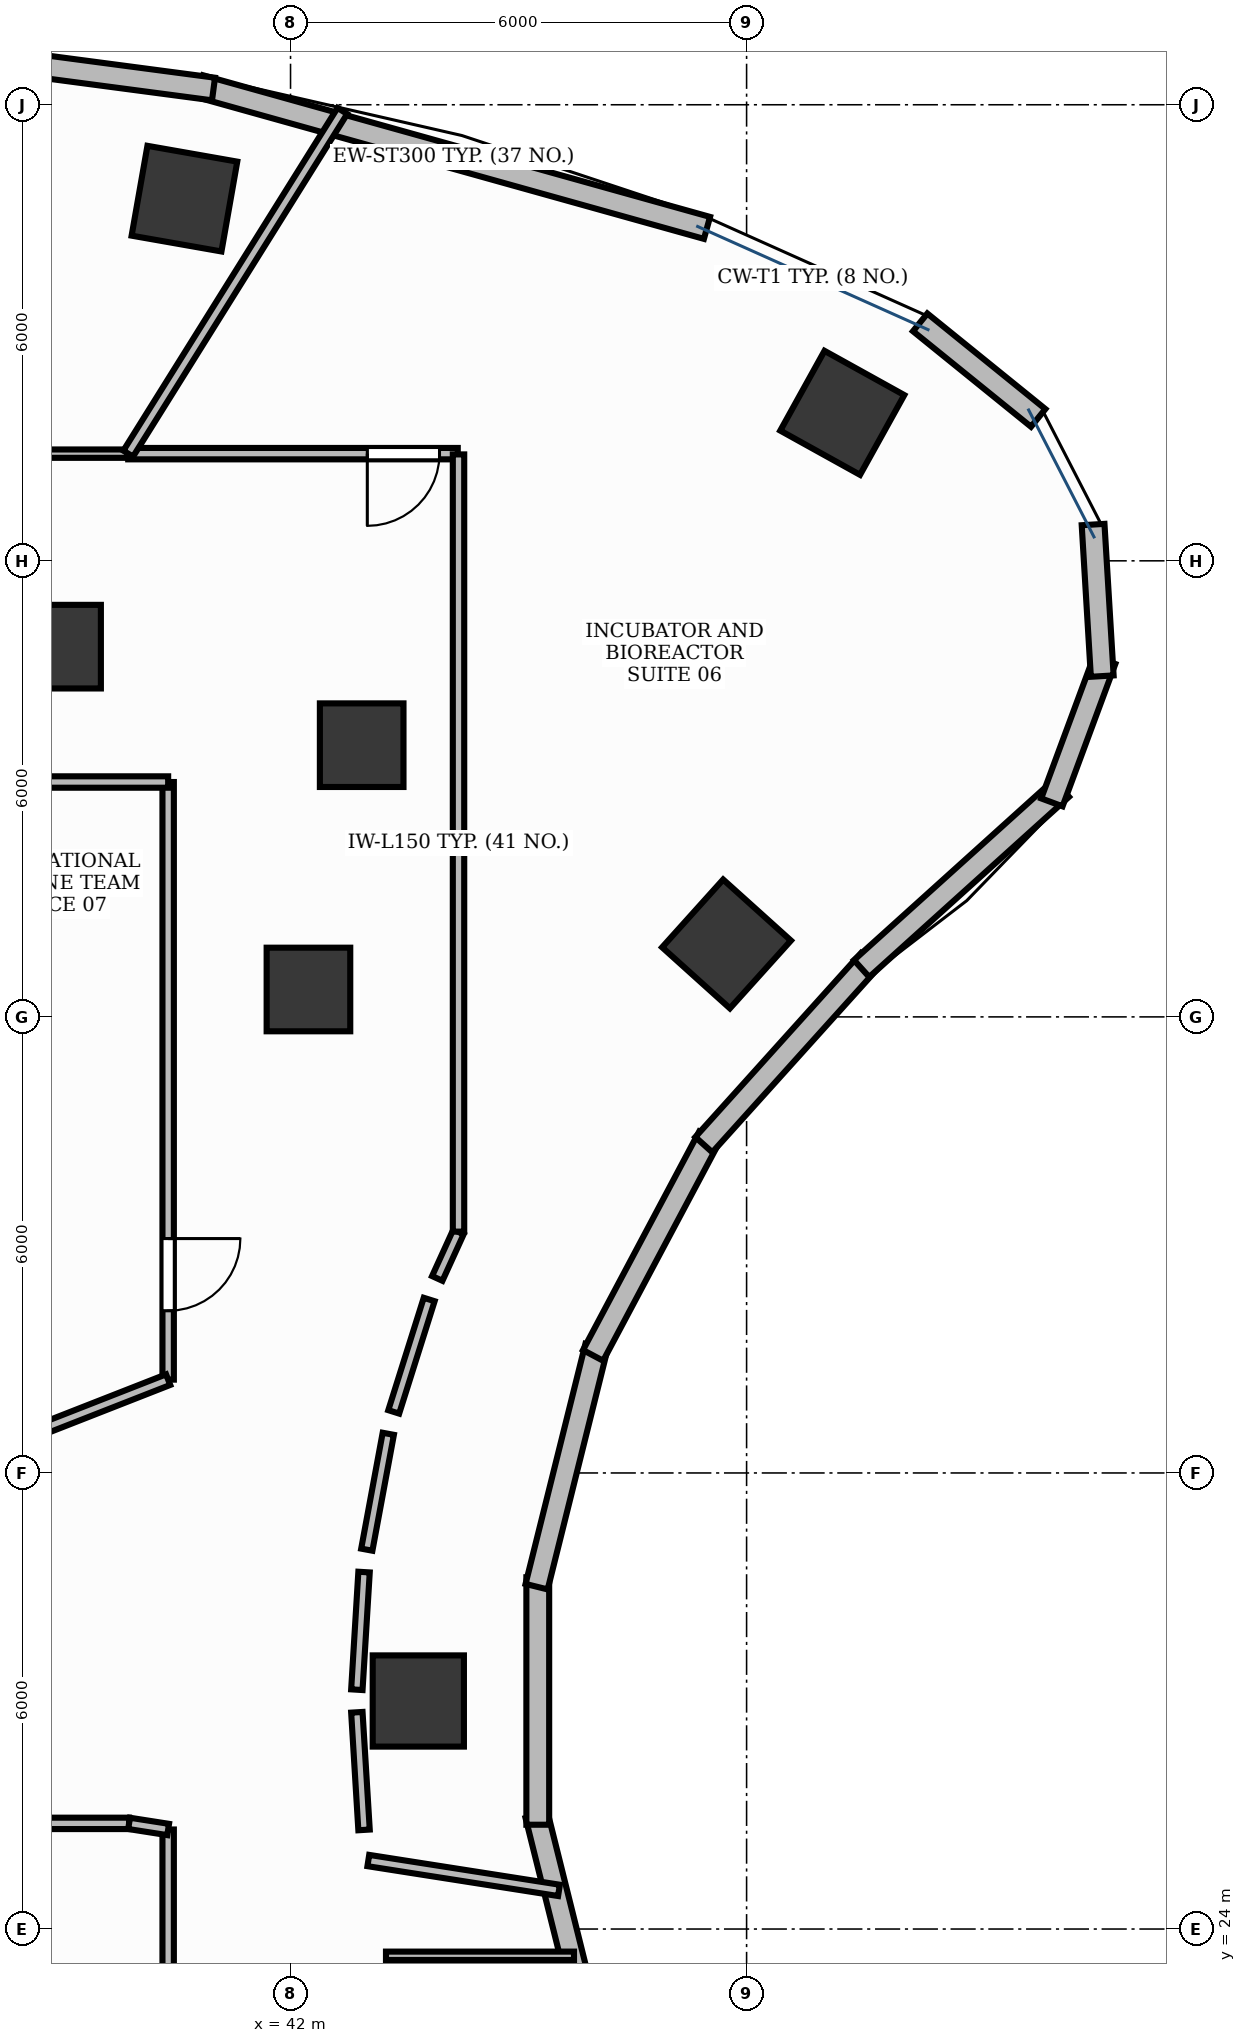
"""IFC4 building model, lengths in metres.
Left out: names, types, materials, properties, quantities, classifications, styles, units other than length and angle.
Written with IfcOpenShell. Run it as: python <this file> out.ifc"""

import sys

from ifc_helpers import new_model, si_unit, direction, frame, frame_2d, origin, origin_2d, place, context, subcontext, project, spatial, rectangle, extrude, element, fill, save


model = new_model("IFC4")
c1 = context("Model", 3, precision=1e-05, world=origin(), true_north=direction((0.0, 1.0)))
c2 = subcontext(c1, "Body", "Model", "MODEL_VIEW")
j1 = project(units=[si_unit("LENGTHUNIT", "METRE"), si_unit("PLANEANGLEUNIT", "RADIAN")], contexts=[c1])
p1 = place(None, origin())
s1 = spatial("IfcSite", under=j1, at=p1, CompositionType="ELEMENT")
p2 = place(p1, origin())
s2 = spatial("IfcBuilding", under=s1, at=p2, CompositionType="ELEMENT")
p3 = place(p2, frame((0.0, 0.0, 119.4)))
s3 = spatial("IfcBuildingStorey", under=s2, at=p3, CompositionType="ELEMENT", Elevation=119.4)
p4 = place(p3, frame((49.259, 43.947, -0.0), z_axis=(0.0, 0.0, 1.0), x_axis=(-0.874535078577, 0.484962262797, 0.0)))
e1 = element("IfcColumn", 1, at=p4, inside=s3, PredefinedType="COLUMN", context=c2, shape_type="SweptSolid", body=[
    extrude(rectangle(XDim=1.2, YDim=1.2, at=origin_2d()), origin(), (0.0, 0.0, 1.0), 3.901),
])
p5 = place(p3, frame((42.936, 39.575, -0.0), z_axis=(0.0, 0.0, 1.0), x_axis=(1.0, 0.0, 0.0)))
e2 = element("IfcColumn", 2, at=p5, inside=s3, PredefinedType="COLUMN", context=c2, shape_type="SweptSolid", body=[
    extrude(rectangle(XDim=1.1, YDim=1.1, at=origin_2d()), origin(), (0.0, 0.0, 1.0), 3.901),
])
p6 = place(p3, frame((40.604, 46.765, -0.0), z_axis=(0.0, 0.0, 1.0), x_axis=(-0.984868307662, 0.173304404339, 0.0)))
e3 = element("IfcColumn", 3, at=p6, inside=s3, PredefinedType="COLUMN", context=c2, shape_type="SweptSolid", body=[
    extrude(rectangle(XDim=1.2, YDim=1.2, at=origin_2d()), origin(), (0.0, 0.0, 1.0), 3.901),
])
p7 = place(p3, frame((38.955, 40.871, -0.0), z_axis=(0.0, 0.0, 1.0), x_axis=(1.0, 0.0, 0.0)))
e4 = element("IfcColumn", 4, at=p7, inside=s3, PredefinedType="COLUMN", context=c2, shape_type="SweptSolid", body=[
    extrude(rectangle(XDim=1.1, YDim=1.1, at=origin_2d()), origin(), (0.0, 0.0, 1.0), 3.901),
])
for number, where, z_axis, x_axis in (
    (5, (43.681, 27.0, -0.0), (0.0, 0.0, 1.0), (0.0, 1.0, 0.0)),
    (6, (47.736, 36.96, -0.0), (0.0, 0.0, 1.0), (0.669, 0.743, 0.0)),
):
    element("IfcColumn", number, at=place(p3, frame(where, z_axis=z_axis, x_axis=x_axis)), inside=s3, PredefinedType="COLUMN", context=c2, shape_type="SweptSolid", body=[
        extrude(rectangle(XDim=1.2, YDim=1.2, at=origin_2d()), origin(), (0.0, 0.0, 1.0), 3.901),
    ])
p8 = place(p3, frame((42.236, 36.361, -0.0), z_axis=(0.0, 0.0, 1.0), x_axis=(1.0, 0.0, 0.0)))
e7 = element("IfcColumn", 7, at=p8, inside=s3, PredefinedType="COLUMN", context=c2, shape_type="SweptSolid", body=[
    extrude(rectangle(XDim=1.1, YDim=1.1, at=origin_2d()), origin(), (0.0, 0.0, 1.0), 3.901),
])
p9 = place(p3, frame((47.479, 46.38, 0.0), z_axis=(0.0, 0.0, 1.0), x_axis=(-0.963116215402, 0.269085777459, 0.0)))
e8 = element("IfcWall", 8, at=p9, inside=s3, PredefinedType="STANDARD", context=c2, shape_type="SweptSolid", body=[
    extrude(rectangle(XDim=6.924, YDim=0.3, at=frame_2d((3.462, 0.0))), origin(), (0.0, 0.0, 1.0), 3.9),
])
p10 = place(p3, frame((40.987, 48.207, 0.0), z_axis=(0.0, 0.0, 1.0), x_axis=(-0.991372969521, 0.131071107816, 0.0)))
e9 = element("IfcWall", 9, at=p10, inside=s3, PredefinedType="STANDARD", context=c2, shape_type="SweptSolid", body=[
    extrude(rectangle(XDim=3.615, YDim=0.3, at=frame_2d((1.808, 0.0))), origin(), (0.0, 0.0, 1.0), 3.9),
])
p11 = place(p3, frame((46.025, 22.337, 0.0), z_axis=(0.0, 0.0, 1.0), x_axis=(-0.241900409149, 0.970301083197, 0.0)))
e10 = element("IfcWall", 10, at=p11, inside=s3, PredefinedType="STANDARD", context=c2, shape_type="SweptSolid", body=[
    extrude(rectangle(XDim=3.256, YDim=0.3, at=frame_2d((1.628, 0.0))), origin(), (0.0, 0.0, 1.0), 3.9),
])
p12 = place(p3, frame((45.253, 25.372, 0.0), z_axis=(0.0, 0.0, 1.0), x_axis=(0.0, 1.0, 0.0)))
e11 = element("IfcWall", 11, at=p12, inside=s3, PredefinedType="STANDARD", context=c2, shape_type="SweptSolid", body=[
    extrude(rectangle(XDim=3.255, YDim=0.3, at=frame_2d((1.628, 0.0))), origin(), (0.0, 0.0, 1.0), 3.9),
])
p13 = place(p3, frame((45.238, 28.504, 0.0), z_axis=(0.0, 0.0, 1.0), x_axis=(0.241900409149, 0.970301083197, 0.0)))
e12 = element("IfcWall", 12, at=p13, inside=s3, PredefinedType="STANDARD", context=c2, shape_type="SweptSolid", body=[
    extrude(rectangle(XDim=3.256, YDim=0.3, at=frame_2d((1.628, 0.0))), origin(), (0.0, 0.0, 1.0), 3.9),
])
p14 = place(p3, frame((45.98, 31.547, 0.0), z_axis=(0.0, 0.0, 1.0), x_axis=(0.469451284634, 0.882958374645, 0.0)))
e13 = element("IfcWall", 13, at=p14, inside=s3, PredefinedType="STANDARD", context=c2, shape_type="SweptSolid", body=[
    extrude(rectangle(XDim=3.256, YDim=0.3, at=frame_2d((1.628, 0.0))), origin(), (0.0, 0.0, 1.0), 3.9),
])
p15 = place(p3, frame((47.437, 34.319, 0.0), z_axis=(0.0, 0.0, 1.0), x_axis=(0.669167727967, 0.743111399353, 0.0)))
e14 = element("IfcWall", 14, at=p15, inside=s3, PredefinedType="STANDARD", context=c2, shape_type="SweptSolid", body=[
    extrude(rectangle(XDim=3.255, YDim=0.3, at=frame_2d((1.628, 0.0))), origin(), (0.0, 0.0, 1.0), 3.9),
])
p16 = place(p3, frame((49.513, 36.636, 0.0), z_axis=(0.0, 0.0, 1.0), x_axis=(0.74255963233, 0.669779958221, 0.0)))
e15 = element("IfcWall", 15, at=p16, inside=s3, PredefinedType="STANDARD", context=c2, shape_type="SweptSolid", body=[
    extrude(rectangle(XDim=3.539, YDim=0.3, at=frame_2d((1.77, 0.0))), origin(), (0.0, 0.0, 1.0), 3.9),
])
p17 = place(p3, frame((52.016, 38.822, 0.0), z_axis=(0.0, 0.0, 1.0), x_axis=(0.347370087337, 0.937728117539, 0.0)))
e16 = element("IfcWall", 16, at=p17, inside=s3, PredefinedType="STANDARD", context=c2, shape_type="SweptSolid", body=[
    extrude(rectangle(XDim=1.997, YDim=0.3, at=frame_2d((0.999, 0.0))), origin(), (0.0, 0.0, 1.0), 3.9),
])
for number, where, z_axis, x_axis in (
    (17, (52.679, 40.483, 0.0), (0.0, 0.0, 1.0), (-0.06, 0.998, 0.0)),
    (18, (51.836, 43.881, 0.0), (0.0, 0.0, 1.0), (-0.777, 0.629, 0.0)),
):
    element("IfcWall", number, at=place(p3, frame(where, z_axis=z_axis, x_axis=x_axis)), inside=s3, PredefinedType="STANDARD", context=c2, shape_type="SweptSolid", body=[
        extrude(rectangle(XDim=1.998, YDim=0.3, at=frame_2d((0.999, 0.0))), origin(), (0.0, 0.0, 1.0), 3.9),
    ])
p18 = place(p3, frame((40.39, 25.31, 0.0), z_axis=(0.0, 0.0, 1.0), x_axis=(0.0, -1.0, 0.0)))
e19 = element("IfcWall", 19, at=p18, inside=s3, PredefinedType="PARTITIONING", context=c2, shape_type="SweptSolid", body=[
    extrude(rectangle(XDim=5.552, YDim=0.15, at=frame_2d((2.776, 0.0))), origin(), (0.0, 0.0, 1.0), 2.91),
])
p19 = place(p18, frame((1.882, 0.0, 0.0)))
e20 = element("IfcOpeningElement", 20, at=p19, cuts=e19, PredefinedType="OPENING", context=c2, shape_type="SweptSolid", body=[
    extrude(rectangle(XDim=0.95, YDim=2.15, at=frame_2d((0.475, 1.075))), frame((0.0, 0.09, 0.0), z_axis=(0.0, -1.0, 0.0), x_axis=(1.0, 0.0, 0.0)), (0.0, 0.0, 1.0), 0.18),
])
p20 = place(p3, frame((44.2, 43.41, 0.0), z_axis=(0.0, 0.0, 1.0), x_axis=(-1.0, 0.0, 0.0)))
e21 = element("IfcWall", 21, at=p20, inside=s3, PredefinedType="PARTITIONING", context=c2, shape_type="SweptSolid", body=[
    extrude(rectangle(XDim=4.336, YDim=0.15, at=frame_2d((2.168, 0.0))), origin(), (0.0, 0.0, 1.0), 2.91),
])
p21 = place(p20, frame((0.24, 0.0, 0.0)))
e22 = element("IfcOpeningElement", 22, at=p21, cuts=e21, PredefinedType="OPENING", context=c2, shape_type="SweptSolid", body=[
    extrude(rectangle(XDim=0.95, YDim=2.15, at=frame_2d((0.475, 1.075))), frame((0.0, 0.09, 0.0), z_axis=(0.0, -1.0, 0.0), x_axis=(1.0, 0.0, 0.0)), (0.0, 0.0, 1.0), 0.18),
])
p22 = place(p3, frame((40.39, 39.09, 0.0), z_axis=(0.0, 0.0, 1.0), x_axis=(0.0, -1.0, 0.0)))
e23 = element("IfcWall", 23, at=p22, inside=s3, PredefinedType="PARTITIONING", context=c2, shape_type="SweptSolid", body=[
    extrude(rectangle(XDim=7.862, YDim=0.15, at=frame_2d((3.931, 0.0))), origin(), (0.0, 0.0, 1.0), 2.91),
])
p23 = place(p22, frame((6.006, 0.0, 0.0)))
e24 = element("IfcOpeningElement", 24, at=p23, cuts=e23, PredefinedType="OPENING", context=c2, shape_type="SweptSolid", body=[
    extrude(rectangle(XDim=0.95, YDim=2.15, at=frame_2d((0.475, 1.075))), frame((0.0, 0.09, 0.0), z_axis=(0.0, -1.0, 0.0), x_axis=(1.0, 0.0, 0.0)), (0.0, 0.0, 1.0), 0.18),
])
p24 = place(p3, frame((39.854, 43.41, 0.0), z_axis=(0.0, 0.0, 1.0), x_axis=(-1.0, 0.0, 0.0)))
e25 = element("IfcWall", 25, at=p24, inside=s3, PredefinedType="MOVABLE", context=c2, shape_type="SweptSolid", body=[
    extrude(rectangle(XDim=19.812, YDim=0.11, at=frame_2d((9.906, 0.0))), origin(), (0.0, 0.0, 1.0), 2.91),
])
p25 = place(p24, frame((5.642, 0.0, 0.0)))
e26 = element("IfcOpeningElement", 26, at=p25, cuts=e25, PredefinedType="OPENING", context=c2, shape_type="SweptSolid", body=[
    extrude(rectangle(XDim=0.95, YDim=2.15, at=frame_2d((0.475, 1.075))), frame((0.0, 0.07, 0.0), z_axis=(0.0, -1.0, 0.0), x_axis=(1.0, 0.0, 0.0)), (0.0, 0.0, 1.0), 0.14),
])
p26 = place(p3, frame((43.256, 23.648, 0.0), z_axis=(0.0, 0.0, 1.0), x_axis=(1.0, 0.0, 0.0)))
e27 = element("IfcWall", 27, at=p26, inside=s3, PredefinedType="MOVABLE", context=c2, shape_type="SweptSolid", body=[
    extrude(rectangle(XDim=2.474, YDim=0.11, at=frame_2d((1.237, 0.0))), origin(), (0.0, 0.0, 1.0), 2.91),
])
p27 = place(p3, frame((37.502, 25.39, 0.0), z_axis=(0.0, 0.0, 1.0), x_axis=(1.0, 0.0, 0.0)))
e28 = element("IfcWall", 28, at=p27, inside=s3, PredefinedType="PARTITIONING", context=c2, shape_type="SweptSolid", body=[
    extrude(rectangle(XDim=2.374, YDim=0.15, at=frame_2d((1.187, 0.0))), origin(), (0.0, 0.0, 1.0), 2.91),
])
p28 = place(p3, frame((39.876, 25.39, 0.0), z_axis=(0.0, 0.0, 1.0), x_axis=(0.988005321265, -0.15441983406, 0.0)))
e29 = element("IfcWall", 29, at=p28, inside=s3, PredefinedType="PARTITIONING", context=c2, shape_type="SweptSolid", body=[
    extrude(rectangle(XDim=0.52, YDim=0.15, at=frame_2d((0.26, 0.0))), origin(), (0.0, 0.0, 1.0), 2.91),
])
p29 = place(p3, frame((45.532, 24.508, 0.0), z_axis=(0.0, 0.0, 1.0), x_axis=(-0.987957888296, 0.154723013653, 0.0)))
e30 = element("IfcWall", 30, at=p29, inside=s3, PredefinedType="PARTITIONING", context=c2, shape_type="SweptSolid", body=[
    extrude(rectangle(XDim=2.539, YDim=0.15, at=frame_2d((1.27, 0.0))), origin(), (0.0, 0.0, 1.0), 2.91),
])
for number, where, z_axis, x_axis in (
    (31, (42.967, 25.304, 0.0), (0.0, 0.0, 1.0), (-0.061, 0.998, 0.0)),
    (32, (42.873, 27.149, 0.0), (0.0, 0.0, 1.0), (0.061, 0.998, 0.0)),
):
    element("IfcWall", number, at=place(p3, frame(where, z_axis=z_axis, x_axis=x_axis)), inside=s3, PredefinedType="PARTITIONING", context=c2, shape_type="SweptSolid", body=[
        extrude(rectangle(XDim=1.55, YDim=0.15, at=frame_2d((0.775, 0.0))), origin(), (0.0, 0.0, 1.0), 2.91),
    ])
p30 = place(p3, frame((43.003, 28.991, 0.0), z_axis=(0.0, 0.0, 1.0), x_axis=(0.182168192784, 0.983267384559, 0.0)))
e33 = element("IfcWall", 33, at=p30, inside=s3, PredefinedType="PARTITIONING", context=c2, shape_type="SweptSolid", body=[
    extrude(rectangle(XDim=1.551, YDim=0.15, at=frame_2d((0.775, 0.0))), origin(), (0.0, 0.0, 1.0), 2.91),
])
p31 = place(p3, frame((43.358, 30.803, 0.0), z_axis=(0.0, 0.0, 1.0), x_axis=(0.300641414783, 0.953737248783, 0.0)))
e34 = element("IfcWall", 34, at=p31, inside=s3, PredefinedType="PARTITIONING", context=c2, shape_type="SweptSolid", body=[
    extrude(rectangle(XDim=1.55, YDim=0.15, at=frame_2d((0.775, 0.0))), origin(), (0.0, 0.0, 1.0), 2.91),
])
p32 = place(p3, frame((43.93, 32.559, 0.0), z_axis=(0.0, 0.0, 1.0), x_axis=(0.414377467152, 0.910105111905, 0.0)))
e35 = element("IfcWall", 35, at=p32, inside=s3, PredefinedType="PARTITIONING", context=c2, shape_type="SweptSolid", body=[
    extrude(rectangle(XDim=0.672, YDim=0.15, at=frame_2d((0.336, 0.0))), origin(), (0.0, 0.0, 1.0), 2.91),
])
p33 = place(p3, frame((44.21, 33.175, 0.0), z_axis=(0.0, 0.0, 1.0), x_axis=(0.0, 1.0, 0.0)))
e36 = element("IfcWall", 36, at=p33, inside=s3, PredefinedType="PARTITIONING", context=c2, shape_type="SweptSolid", body=[
    extrude(rectangle(XDim=10.225, YDim=0.15, at=frame_2d((5.112, 0.0))), origin(), (0.0, 0.0, 1.0), 2.91),
])
p34 = place(p3, frame((39.864, 43.41, 0.0), z_axis=(0.0, 0.0, 1.0), x_axis=(0.529928772796, 0.848042154473, 0.0)))
e37 = element("IfcWall", 37, at=p34, inside=s3, PredefinedType="PARTITIONING", context=c2, shape_type="SweptSolid", body=[
    extrude(rectangle(XDim=5.317, YDim=0.15, at=frame_2d((2.658, 0.0))), origin(), (0.0, 0.0, 1.0), 2.91),
])
p35 = place(p3, frame((37.21, 39.09, 0.0), z_axis=(0.0, 0.0, 1.0), x_axis=(1.0, 0.0, 0.0)))
e38 = element("IfcWall", 38, at=p35, inside=s3, PredefinedType="PARTITIONING", context=c2, shape_type="SweptSolid", body=[
    extrude(rectangle(XDim=3.18, YDim=0.15, at=frame_2d((1.59, 0.0))), origin(), (0.0, 0.0, 1.0), 2.91),
])
p36 = place(p3, frame((40.39, 31.228, 0.0), z_axis=(0.0, 0.0, 1.0), x_axis=(-0.931038232899, -0.364921647592, 0.0)))
e39 = element("IfcWall", 39, at=p36, inside=s3, PredefinedType="PARTITIONING", context=c2, shape_type="SweptSolid", body=[
    extrude(rectangle(XDim=3.102, YDim=0.15, at=frame_2d((1.551, 0.0))), origin(), (0.0, 0.0, 1.0), 2.91),
])
p37 = place(p21, origin())
e40 = element("IfcDoor", 40, at=p37, inside=s3, OperationType="SINGLE_SWING_RIGHT", PredefinedType="DOOR", context=c2, shape_type="SweptSolid", body=[
    extrude(rectangle(XDim=0.95, YDim=2.15, at=frame_2d((0.475, 1.075))), frame((0.0, 0.025, 0.0), z_axis=(0.0, -1.0, 0.0), x_axis=(1.0, 0.0, 0.0)), (0.0, 0.0, 1.0), 0.05),
])
fill(e22, e40)
p38 = place(p23, origin())
e41 = element("IfcDoor", 41, at=p38, inside=s3, OperationType="SINGLE_SWING_LEFT", PredefinedType="DOOR", context=c2, shape_type="SweptSolid", body=[
    extrude(rectangle(XDim=0.95, YDim=2.15, at=frame_2d((0.475, 1.075))), frame((0.0, 0.025, 0.0), z_axis=(0.0, -1.0, 0.0), x_axis=(1.0, 0.0, 0.0)), (0.0, 0.0, 1.0), 0.05),
])
fill(e24, e41)
save(model, sys.argv[1])
